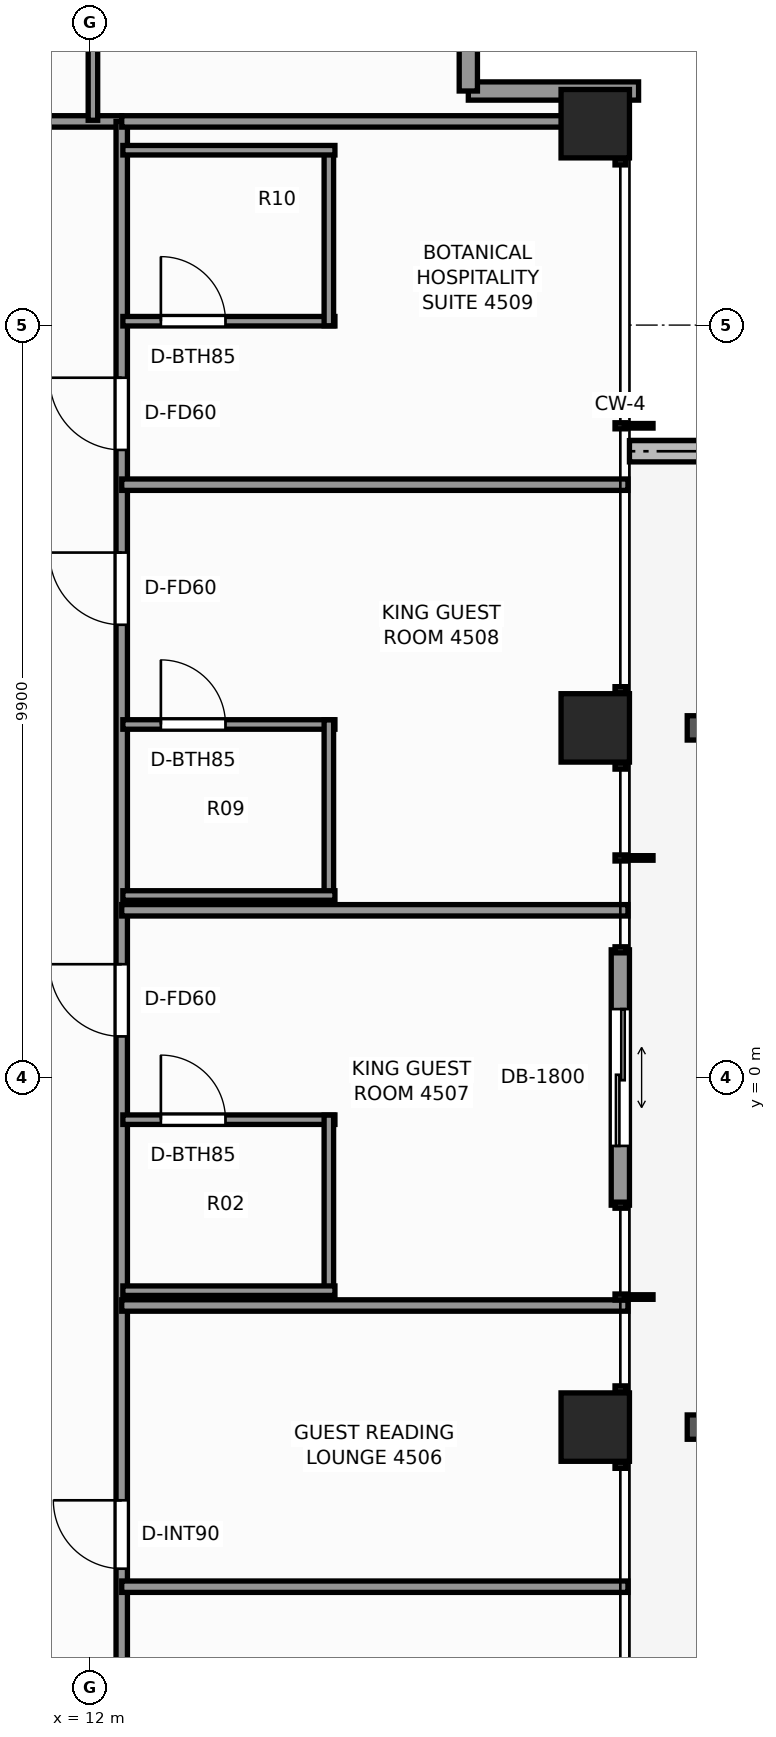
"""IFC4 building model, lengths in metres.
Left out: names, types, materials, properties, quantities, classifications, styles, units other than length and angle.
Written with IfcOpenShell. Run it as: python <this file> out.ifc"""

import sys

from ifc_helpers import new_model, si_unit, direction, frame, frame_2d, origin, origin_2d, place, context, subcontext, project, spatial, rectangle, extrude, element, fill, save


model = new_model("IFC4")
c1 = context("Model", 3, precision=1e-05, world=origin(), true_north=direction((0.0, 1.0)))
c2 = subcontext(c1, "Body", "Model", "MODEL_VIEW")
j1 = project(units=[si_unit("LENGTHUNIT", "METRE"), si_unit("PLANEANGLEUNIT", "RADIAN")], contexts=[c1])
p1 = place(None, origin())
s1 = spatial("IfcSite", under=j1, at=p1, CompositionType="ELEMENT")
p2 = place(p1, origin())
s2 = spatial("IfcBuilding", under=s1, at=p2, CompositionType="ELEMENT")
p3 = place(p2, frame((0.0, 0.0, 156.9)))
s3 = spatial("IfcBuildingStorey", under=s2, at=p3, CompositionType="ELEMENT", Elevation=156.9)
for number, where, z_axis, x_axis in (
    (1, (18.65, -4.6, 0.0), (0.0, 0.0, 1.0), (1.0, 0.0, 0.0)),
    (2, (18.65, 4.6, 0.0), (0.0, 0.0, 1.0), (1.0, 0.0, 0.0)),
    (3, (18.65, 12.55, 0.0), (0.0, 0.0, 1.0), (1.0, 0.0, 0.0)),
):
    element("IfcColumn", number, at=place(p3, frame(where, z_axis=z_axis, x_axis=x_axis)), inside=s3, PredefinedType="COLUMN", context=c2, shape_type="SweptSolid", body=[
        extrude(rectangle(XDim=0.9, YDim=0.9, at=origin_2d()), origin(), (0.0, 0.0, 1.0), 3.3),
    ])
p4 = place(p3, frame((22.467, 8.24, -0.02), z_axis=(0.0, 0.0, 1.0), x_axis=(-1.0, 0.0, 0.0)))
e4 = element("IfcWall", 4, at=p4, inside=s3, PredefinedType="PARAPET", context=c2, shape_type="SweptSolid", body=[
    extrude(rectangle(XDim=3.367, YDim=0.28, at=frame_2d((1.684, 0.0))), origin(), (0.0, 0.0, 1.0), 0.42),
])
p5 = place(p3, frame((18.98, 1.68, 0.0), z_axis=(0.0, 0.0, 1.0), x_axis=(0.0, -1.0, 0.0)))
e5 = element("IfcWall", 5, at=p5, inside=s3, PredefinedType="STANDARD", context=c2, shape_type="SweptSolid", body=[
    extrude(rectangle(XDim=3.36, YDim=0.24, at=frame_2d((1.68, 0.0))), origin(), (0.0, 0.0, 1.0), 3.1),
])
p6 = place(p5, frame((0.78, 0.0, 0.0)))
e6 = element("IfcOpeningElement", 6, at=p6, cuts=e5, PredefinedType="OPENING", context=c2, shape_type="SweptSolid", body=[
    extrude(rectangle(XDim=1.8, YDim=2.2, at=frame_2d((0.9, 1.1))), frame((0.0, 0.13, 0.0), z_axis=(0.0, -1.0, 0.0), x_axis=(1.0, 0.0, 0.0)), (0.0, 0.0, 1.0), 0.26),
])
p7 = place(p3, frame((16.98, 12.98, 0.0), z_axis=(0.0, 0.0, 1.0), x_axis=(1.0, 0.0, 0.0)))
e7 = element("IfcWall", 7, at=p7, inside=s3, PredefinedType="STANDARD", context=c2, shape_type="SweptSolid", body=[
    extrude(rectangle(XDim=2.24, YDim=0.24, at=frame_2d((1.12, 0.0))), origin(), (0.0, 0.0, 1.0), 2.483),
])
p8 = place(p3, frame((16.98, 15.22, 0.0), z_axis=(0.0, 0.0, 1.0), x_axis=(0.0, -1.0, 0.0)))
e8 = element("IfcWall", 8, at=p8, inside=s3, PredefinedType="STANDARD", context=c2, shape_type="SweptSolid", body=[
    extrude(rectangle(XDim=2.24, YDim=0.24, at=frame_2d((1.12, 0.0))), origin(), (0.0, 0.0, 1.0), 2.483),
])
p9 = place(p8, frame((0.45, 0.0, 0.65)))
e9 = element("IfcOpeningElement", 9, at=p9, cuts=e8, PredefinedType="OPENING", context=c2, shape_type="SweptSolid", body=[
    extrude(rectangle(XDim=1.1, YDim=1.45, at=frame_2d((0.55, 0.725))), frame((0.0, 0.13, 0.0), z_axis=(0.0, -1.0, 0.0), x_axis=(1.0, 0.0, 0.0)), (0.0, 0.0, 1.0), 0.26),
])
p10 = place(p3, frame((-12.42, 12.58, 0.0), z_axis=(0.0, 0.0, 1.0), x_axis=(1.0, 0.0, 0.0)))
e10 = element("IfcWall", 10, at=p10, inside=s3, PredefinedType="PARTITIONING", context=c2, shape_type="SweptSolid", body=[
    extrude(rectangle(XDim=24.84, YDim=0.15, at=frame_2d((12.42, 0.0))), origin(), (0.0, 0.0, 1.0), 2.389),
])
p11 = place(p10, frame((3.89, 0.0, 0.0)))
e11 = element("IfcOpeningElement", 11, at=p11, cuts=e10, PredefinedType="OPENING", context=c2, shape_type="SweptSolid", body=[
    extrude(rectangle(XDim=0.95, YDim=2.06, at=frame_2d((0.475, 1.03))), frame((0.0, 0.085, 0.0), z_axis=(0.0, -1.0, 0.0), x_axis=(1.0, 0.0, 0.0)), (0.0, 0.0, 1.0), 0.17),
])
p12 = place(p10, frame((8.806, 0.0, 0.0)))
e12 = element("IfcOpeningElement", 12, at=p12, cuts=e10, PredefinedType="OPENING", context=c2, shape_type="SweptSolid", body=[
    extrude(rectangle(XDim=0.9, YDim=2.06, at=frame_2d((0.45, 1.03))), frame((0.0, 0.085, 0.0), z_axis=(0.0, -1.0, 0.0), x_axis=(1.0, 0.0, 0.0)), (0.0, 0.0, 1.0), 0.17),
])
p13 = place(p10, frame((13.724, 0.0, 0.0)))
e13 = element("IfcOpeningElement", 13, at=p13, cuts=e10, PredefinedType="OPENING", context=c2, shape_type="SweptSolid", body=[
    extrude(rectangle(XDim=0.95, YDim=2.06, at=frame_2d((0.475, 1.03))), frame((0.0, 0.085, 0.0), z_axis=(0.0, -1.0, 0.0), x_axis=(1.0, 0.0, 0.0)), (0.0, 0.0, 1.0), 0.17),
])
p14 = place(p10, frame((16.886, 0.0, 0.0)))
e14 = element("IfcOpeningElement", 14, at=p14, cuts=e10, PredefinedType="OPENING", context=c2, shape_type="SweptSolid", body=[
    extrude(rectangle(XDim=0.9, YDim=2.06, at=frame_2d((0.45, 1.03))), frame((0.0, 0.085, 0.0), z_axis=(0.0, -1.0, 0.0), x_axis=(1.0, 0.0, 0.0)), (0.0, 0.0, 1.0), 0.17),
])
p15 = place(p10, frame((20.0, 0.0, 0.0)))
e15 = element("IfcOpeningElement", 15, at=p15, cuts=e10, PredefinedType="OPENING", context=c2, shape_type="SweptSolid", body=[
    extrude(rectangle(XDim=0.95, YDim=2.06, at=frame_2d((0.475, 1.03))), frame((0.0, 0.085, 0.0), z_axis=(0.0, -1.0, 0.0), x_axis=(1.0, 0.0, 0.0)), (0.0, 0.0, 1.0), 0.17),
])
p16 = place(p3, frame((12.42, -12.26, 0.0), z_axis=(0.0, 0.0, 1.0), x_axis=(0.0, 1.0, 0.0)))
e16 = element("IfcWall", 16, at=p16, inside=s3, PredefinedType="PARTITIONING", context=c2, shape_type="SweptSolid", body=[
    extrude(rectangle(XDim=24.84, YDim=0.15, at=frame_2d((12.42, 0.0))), origin(), (0.0, 0.0, 1.0), 2.389),
])
p17 = place(p16, frame((3.631, 0.0, 0.0)))
e17 = element("IfcOpeningElement", 17, at=p17, cuts=e16, PredefinedType="OPENING", context=c2, shape_type="SweptSolid", body=[
    extrude(rectangle(XDim=0.95, YDim=2.06, at=frame_2d((0.475, 1.03))), frame((0.0, 0.085, 0.0), z_axis=(0.0, -1.0, 0.0), x_axis=(1.0, 0.0, 0.0)), (0.0, 0.0, 1.0), 0.17),
])
p18 = place(p16, frame((5.797, 0.0, 0.0)))
e18 = element("IfcOpeningElement", 18, at=p18, cuts=e16, PredefinedType="OPENING", context=c2, shape_type="SweptSolid", body=[
    extrude(rectangle(XDim=0.9, YDim=2.06, at=frame_2d((0.45, 1.03))), frame((0.0, 0.085, 0.0), z_axis=(0.0, -1.0, 0.0), x_axis=(1.0, 0.0, 0.0)), (0.0, 0.0, 1.0), 0.17),
])
p19 = place(p16, frame((12.801, 0.0, 0.0)))
e19 = element("IfcOpeningElement", 19, at=p19, cuts=e16, PredefinedType="OPENING", context=c2, shape_type="SweptSolid", body=[
    extrude(rectangle(XDim=0.95, YDim=2.06, at=frame_2d((0.475, 1.03))), frame((0.0, 0.085, 0.0), z_axis=(0.0, -1.0, 0.0), x_axis=(1.0, 0.0, 0.0)), (0.0, 0.0, 1.0), 0.17),
])
p20 = place(p16, frame((18.217, 0.0, 0.0)))
e20 = element("IfcOpeningElement", 20, at=p20, cuts=e16, PredefinedType="OPENING", context=c2, shape_type="SweptSolid", body=[
    extrude(rectangle(XDim=0.95, YDim=2.06, at=frame_2d((0.475, 1.03))), frame((0.0, 0.085, 0.0), z_axis=(0.0, -1.0, 0.0), x_axis=(1.0, 0.0, 0.0)), (0.0, 0.0, 1.0), 0.17),
])
p21 = place(p16, frame((20.517, 0.0, 0.0)))
e21 = element("IfcOpeningElement", 21, at=p21, cuts=e16, PredefinedType="OPENING", context=c2, shape_type="SweptSolid", body=[
    extrude(rectangle(XDim=0.95, YDim=2.06, at=frame_2d((0.475, 1.03))), frame((0.0, 0.085, 0.0), z_axis=(0.0, -1.0, 0.0), x_axis=(1.0, 0.0, 0.0)), (0.0, 0.0, 1.0), 0.17),
])
p22 = place(p3, frame((12.42, 12.58, 0.0), z_axis=(0.0, 0.0, 1.0), x_axis=(1.0, 0.0, 0.0)))
e22 = element("IfcWall", 22, at=p22, inside=s3, PredefinedType="PARTITIONING", context=c2, shape_type="SweptSolid", body=[
    extrude(rectangle(XDim=6.66, YDim=0.15, at=frame_2d((3.33, 0.0))), origin(), (0.0, 0.0, 1.0), 2.389),
])
for number, where, z_axis, x_axis in (
    (23, (12.42, -6.7, 0.0), (0.0, 0.0, 1.0), (1.0, 0.0, 0.0)),
    (24, (12.42, -3.0, 0.0), (0.0, 0.0, 1.0), (1.0, 0.0, 0.0)),
    (25, (12.42, 2.2, 0.0), (0.0, 0.0, 1.0), (1.0, 0.0, 0.0)),
):
    element("IfcWall", number, at=place(p3, frame(where, z_axis=z_axis, x_axis=x_axis)), inside=s3, PredefinedType="PARTITIONING", context=c2, shape_type="SweptSolid", body=[
        extrude(rectangle(XDim=6.66, YDim=0.15, at=frame_2d((3.33, 0.0))), origin(), (0.0, 0.0, 1.0), 2.473),
    ])
p23 = place(p3, frame((12.435, -0.555, 0.0), z_axis=(0.0, 0.0, 1.0), x_axis=(1.0, 0.0, 0.0)))
e26 = element("IfcWall", 26, at=p23, inside=s3, PredefinedType="PARTITIONING", context=c2, shape_type="SweptSolid", body=[
    extrude(rectangle(XDim=2.79, YDim=0.125, at=frame_2d((1.395, 0.0))), origin(), (0.0, 0.0, 1.0), 3.1),
])
p24 = place(p23, frame((0.5, 0.0, 0.0)))
e27 = element("IfcOpeningElement", 27, at=p24, cuts=e26, PredefinedType="OPENING", context=c2, shape_type="SweptSolid", body=[
    extrude(rectangle(XDim=0.85, YDim=2.03, at=frame_2d((0.425, 1.015))), frame((0.0, 0.073, 0.0), z_axis=(0.0, -1.0, 0.0), x_axis=(1.0, 0.0, 0.0)), (0.0, 0.0, 1.0), 0.145),
])
p25 = place(p3, frame((15.145, -2.865, 0.0), z_axis=(0.0, 0.0, 1.0), x_axis=(0.0, 1.0, 0.0)))
e28 = element("IfcWall", 28, at=p25, inside=s3, PredefinedType="PARTITIONING", context=c2, shape_type="SweptSolid", body=[
    extrude(rectangle(XDim=2.37, YDim=0.125, at=frame_2d((1.185, 0.0))), origin(), (0.0, 0.0, 1.0), 3.1),
])
p26 = place(p3, frame((12.435, -2.805, 0.0), z_axis=(0.0, 0.0, 1.0), x_axis=(1.0, 0.0, 0.0)))
e29 = element("IfcWall", 29, at=p26, inside=s3, PredefinedType="PARTITIONING", context=c2, shape_type="SweptSolid", body=[
    extrude(rectangle(XDim=2.79, YDim=0.125, at=frame_2d((1.395, 0.0))), origin(), (0.0, 0.0, 1.0), 3.1),
])
p27 = place(p3, frame((12.42, 7.8, 0.0), z_axis=(0.0, 0.0, 1.0), x_axis=(1.0, 0.0, 0.0)))
e30 = element("IfcWall", 30, at=p27, inside=s3, PredefinedType="PARTITIONING", context=c2, shape_type="SweptSolid", body=[
    extrude(rectangle(XDim=6.66, YDim=0.15, at=frame_2d((3.33, 0.0))), origin(), (0.0, 0.0, 1.0), 2.473),
])
p28 = place(p3, frame((12.435, 4.645, 0.0), z_axis=(0.0, 0.0, 1.0), x_axis=(1.0, 0.0, 0.0)))
e31 = element("IfcWall", 31, at=p28, inside=s3, PredefinedType="PARTITIONING", context=c2, shape_type="SweptSolid", body=[
    extrude(rectangle(XDim=2.79, YDim=0.125, at=frame_2d((1.395, 0.0))), origin(), (0.0, 0.0, 1.0), 2.389),
])
p29 = place(p28, frame((0.5, 0.0, 0.0)))
e32 = element("IfcOpeningElement", 32, at=p29, cuts=e31, PredefinedType="OPENING", context=c2, shape_type="SweptSolid", body=[
    extrude(rectangle(XDim=0.85, YDim=2.03, at=frame_2d((0.425, 1.015))), frame((0.0, 0.073, 0.0), z_axis=(0.0, -1.0, 0.0), x_axis=(1.0, 0.0, 0.0)), (0.0, 0.0, 1.0), 0.145),
])
p30 = place(p3, frame((15.145, 2.335, 0.0), z_axis=(0.0, 0.0, 1.0), x_axis=(0.0, 1.0, 0.0)))
e33 = element("IfcWall", 33, at=p30, inside=s3, PredefinedType="PARTITIONING", context=c2, shape_type="SweptSolid", body=[
    extrude(rectangle(XDim=2.37, YDim=0.125, at=frame_2d((1.185, 0.0))), origin(), (0.0, 0.0, 1.0), 2.389),
])
p31 = place(p3, frame((12.435, 2.395, 0.0), z_axis=(0.0, 0.0, 1.0), x_axis=(1.0, 0.0, 0.0)))
e34 = element("IfcWall", 34, at=p31, inside=s3, PredefinedType="PARTITIONING", context=c2, shape_type="SweptSolid", body=[
    extrude(rectangle(XDim=2.79, YDim=0.125, at=frame_2d((1.395, 0.0))), origin(), (0.0, 0.0, 1.0), 3.1),
])
p32 = place(p3, frame((12.435, 9.951, 0.0), z_axis=(0.0, 0.0, 1.0), x_axis=(1.0, 0.0, 0.0)))
e35 = element("IfcWall", 35, at=p32, inside=s3, PredefinedType="PARTITIONING", context=c2, shape_type="SweptSolid", body=[
    extrude(rectangle(XDim=2.79, YDim=0.125, at=frame_2d((1.395, 0.0))), origin(), (0.0, 0.0, 1.0), 3.1),
])
p33 = place(p32, frame((0.5, 0.0, 0.0)))
e36 = element("IfcOpeningElement", 36, at=p33, cuts=e35, PredefinedType="OPENING", context=c2, shape_type="SweptSolid", body=[
    extrude(rectangle(XDim=0.85, YDim=2.03, at=frame_2d((0.425, 1.015))), frame((0.0, 0.073, 0.0), z_axis=(0.0, -1.0, 0.0), x_axis=(1.0, 0.0, 0.0)), (0.0, 0.0, 1.0), 0.145),
])
p34 = place(p3, frame((15.145, 9.891, 0.0), z_axis=(0.0, 0.0, 1.0), x_axis=(0.0, 1.0, 0.0)))
e37 = element("IfcWall", 37, at=p34, inside=s3, PredefinedType="PARTITIONING", context=c2, shape_type="SweptSolid", body=[
    extrude(rectangle(XDim=2.37, YDim=0.125, at=frame_2d((1.185, 0.0))), origin(), (0.0, 0.0, 1.0), 2.389),
])
for number, where, z_axis, x_axis in (
    (38, (12.435, 12.201, 0.0), (0.0, 0.0, 1.0), (1.0, 0.0, 0.0)),
    (39, (12.041, 12.595, 0.0), (0.0, 0.0, 1.0), (0.0, 1.0, 0.0)),
):
    element("IfcWall", number, at=place(p3, frame(where, z_axis=z_axis, x_axis=x_axis)), inside=s3, PredefinedType="PARTITIONING", context=c2, shape_type="SweptSolid", body=[
        extrude(rectangle(XDim=2.79, YDim=0.125, at=frame_2d((1.395, 0.0))), origin(), (0.0, 0.0, 1.0), 3.1),
    ])
p35 = place(p6, origin())
e40 = element("IfcDoor", 40, at=p35, inside=s3, OperationType="DOUBLE_DOOR_SLIDING", PredefinedType="DOOR", context=c2, shape_type="SweptSolid", body=[
    extrude(rectangle(XDim=1.8, YDim=2.2, at=frame_2d((0.9, 1.1))), frame((0.0, 0.025, 0.0), z_axis=(0.0, -1.0, 0.0), x_axis=(1.0, 0.0, 0.0)), (0.0, 0.0, 1.0), 0.05),
])
fill(e6, e40)
p36 = place(p18, origin())
e41 = element("IfcDoor", 41, at=p36, inside=s3, OperationType="SINGLE_SWING_RIGHT", PredefinedType="DOOR", context=c2, shape_type="SweptSolid", body=[
    extrude(rectangle(XDim=0.9, YDim=2.06, at=frame_2d((0.45, 1.03))), frame((0.0, 0.025, 0.0), z_axis=(0.0, -1.0, 0.0), x_axis=(1.0, 0.0, 0.0)), (0.0, 0.0, 1.0), 0.05),
])
fill(e18, e41)
p37 = place(p24, origin())
e42 = element("IfcDoor", 42, at=p37, inside=s3, OperationType="SINGLE_SWING_LEFT", PredefinedType="DOOR", context=c2, shape_type="SweptSolid", body=[
    extrude(rectangle(XDim=0.85, YDim=2.03, at=frame_2d((0.425, 1.015))), frame((0.0, 0.025, 0.0), z_axis=(0.0, -1.0, 0.0), x_axis=(1.0, 0.0, 0.0)), (0.0, 0.0, 1.0), 0.05),
])
fill(e27, e42)
p38 = place(p19, origin())
e43 = element("IfcDoor", 43, at=p38, inside=s3, OperationType="SINGLE_SWING_RIGHT", PredefinedType="DOOR", context=c2, shape_type="SweptSolid", body=[
    extrude(rectangle(XDim=0.95, YDim=2.06, at=frame_2d((0.475, 1.03))), frame((0.0, 0.025, 0.0), z_axis=(0.0, -1.0, 0.0), x_axis=(1.0, 0.0, 0.0)), (0.0, 0.0, 1.0), 0.05),
])
fill(e19, e43)
p39 = place(p29, origin())
e44 = element("IfcDoor", 44, at=p39, inside=s3, OperationType="SINGLE_SWING_LEFT", PredefinedType="DOOR", context=c2, shape_type="SweptSolid", body=[
    extrude(rectangle(XDim=0.85, YDim=2.03, at=frame_2d((0.425, 1.015))), frame((0.0, 0.025, 0.0), z_axis=(0.0, -1.0, 0.0), x_axis=(1.0, 0.0, 0.0)), (0.0, 0.0, 1.0), 0.05),
])
fill(e32, e44)
p40 = place(p20, origin())
e45 = element("IfcDoor", 45, at=p40, inside=s3, OperationType="SINGLE_SWING_RIGHT", PredefinedType="DOOR", context=c2, shape_type="SweptSolid", body=[
    extrude(rectangle(XDim=0.95, YDim=2.06, at=frame_2d((0.475, 1.03))), frame((0.0, 0.025, 0.0), z_axis=(0.0, -1.0, 0.0), x_axis=(1.0, 0.0, 0.0)), (0.0, 0.0, 1.0), 0.05),
])
fill(e20, e45)
p41 = place(p33, origin())
e46 = element("IfcDoor", 46, at=p41, inside=s3, OperationType="SINGLE_SWING_LEFT", PredefinedType="DOOR", context=c2, shape_type="SweptSolid", body=[
    extrude(rectangle(XDim=0.85, YDim=2.03, at=frame_2d((0.425, 1.015))), frame((0.0, 0.025, 0.0), z_axis=(0.0, -1.0, 0.0), x_axis=(1.0, 0.0, 0.0)), (0.0, 0.0, 1.0), 0.05),
])
fill(e36, e46)
p42 = place(p21, origin())
e47 = element("IfcDoor", 47, at=p42, inside=s3, OperationType="SINGLE_SWING_RIGHT", PredefinedType="DOOR", context=c2, shape_type="SweptSolid", body=[
    extrude(rectangle(XDim=0.95, YDim=2.06, at=frame_2d((0.475, 1.03))), frame((0.0, 0.025, 0.0), z_axis=(0.0, -1.0, 0.0), x_axis=(1.0, 0.0, 0.0)), (0.0, 0.0, 1.0), 0.05),
])
fill(e21, e47)
save(model, sys.argv[1])
